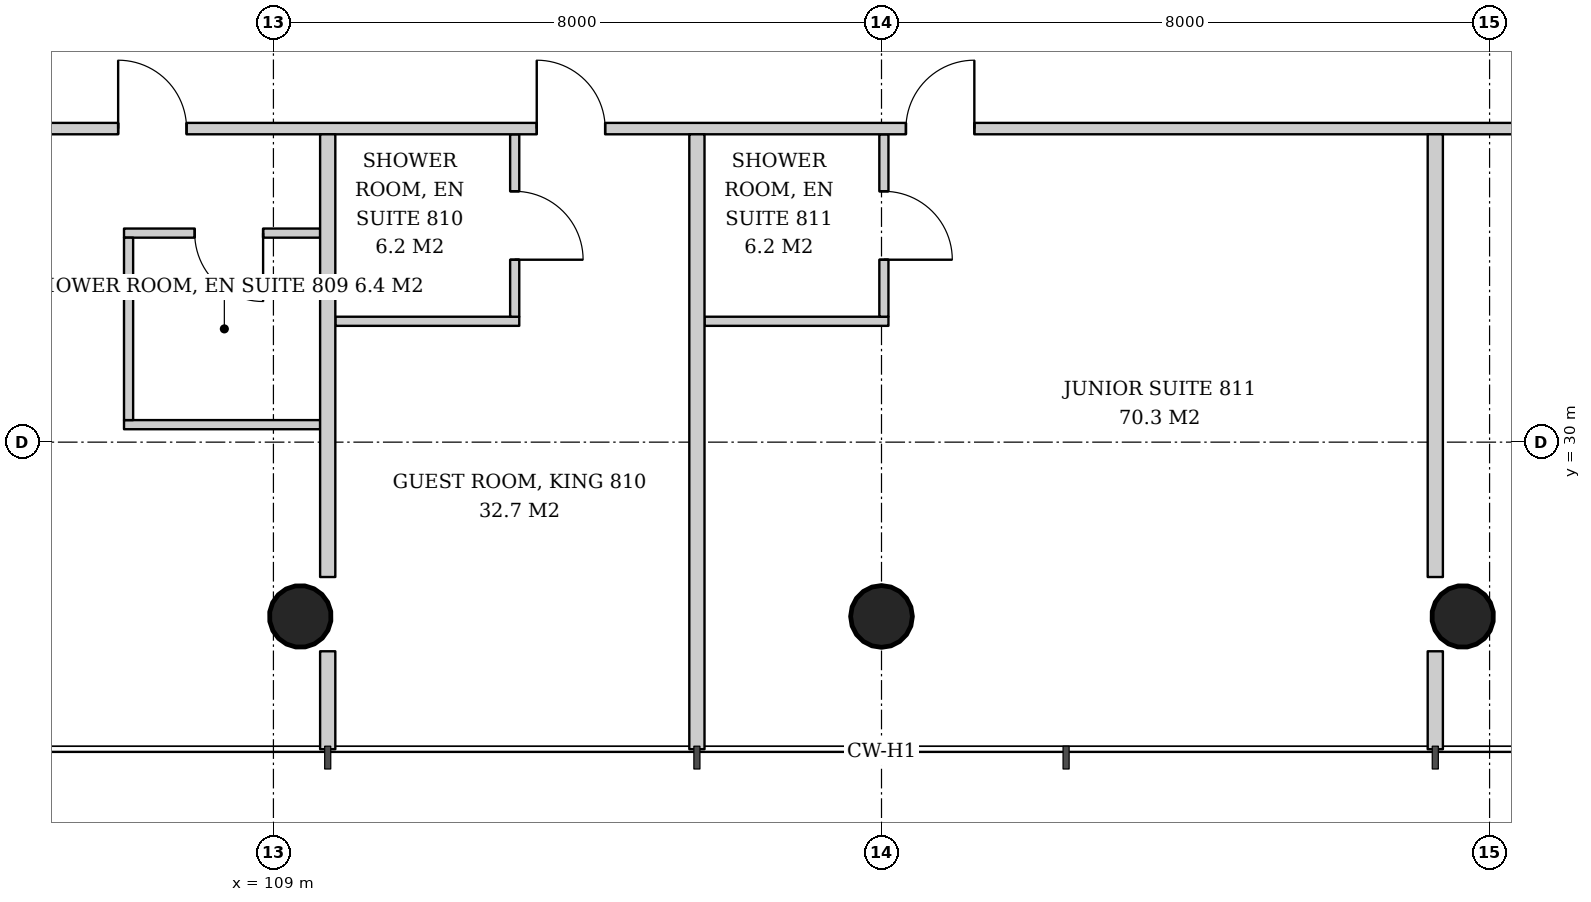
"""IFC4 building model, lengths in metres.
Left out: names, types, materials, properties, quantities, classifications, styles, units other than length and angle.
Written with IfcOpenShell. Run it as: python <this file> out.ifc"""

import sys

from ifc_helpers import new_model, si_unit, direction, frame, frame_2d, origin, origin_2d, place, context, subcontext, project, spatial, rectangle, hollow_circle, extrude, element, fill, save


model = new_model("IFC4")
c1 = context("Model", 3, precision=1e-05, world=origin(), true_north=direction((0.0, 1.0)))
c2 = subcontext(c1, "Body", "Model", "MODEL_VIEW")
j1 = project(units=[si_unit("LENGTHUNIT", "METRE"), si_unit("PLANEANGLEUNIT", "RADIAN")], contexts=[c1])
p1 = place(None, origin())
s1 = spatial("IfcSite", under=j1, at=p1, CompositionType="ELEMENT")
p2 = place(p1, origin())
s2 = spatial("IfcBuilding", under=s1, at=p2, CompositionType="ELEMENT")
p3 = place(p2, frame((0.0, 0.0, 36.2)))
s3 = spatial("IfcBuildingStorey", under=s2, at=p3, CompositionType="ELEMENT", Elevation=36.2)
p4 = place(p3, frame((109.328, 27.655, 0.0), z_axis=(0.021497765643, 0.042995531285, 0.998843946952), x_axis=(-0.894427191, 0.4472135955, 0.0)))
e1 = element("IfcColumn", 1, at=p4, inside=s3, PredefinedType="COLUMN", context=c2, shape_type="SweptSolid", body=[
    extrude(hollow_circle(Radius=0.406, WallThickness=0.03, at=origin_2d()), origin(), (0.0, 0.0, 1.0), 3.804),
])
p5 = place(p3, frame((117.0, 27.655, 0.0), z_axis=(0.0, 0.043005470007, 0.999074836811), x_axis=(-1.0, 0.0, 0.0)))
e2 = element("IfcColumn", 2, at=p5, inside=s3, PredefinedType="COLUMN", context=c2, shape_type="SweptSolid", body=[
    extrude(hollow_circle(Radius=0.406, WallThickness=0.03, at=origin_2d()), origin(), (0.0, 0.0, 1.0), 3.803),
])
p6 = place(p3, frame((124.672, 27.655, 0.0), z_axis=(-0.021497765643, 0.042995531285, 0.998843946952), x_axis=(-0.894427191, -0.4472135955, 0.0)))
e3 = element("IfcColumn", 3, at=p6, inside=s3, PredefinedType="COLUMN", context=c2, shape_type="SweptSolid", body=[
    extrude(hollow_circle(Radius=0.406, WallThickness=0.03, at=origin_2d()), origin(), (0.0, 0.0, 1.0), 3.804),
])
p7 = place(p3, frame((109.614, 32.75, 0.0), z_axis=(0.0, 0.0, 1.0), x_axis=(-1.0, 0.0, 0.0)))
e4 = element("IfcWall", 4, at=p7, inside=s3, PredefinedType="PARTITIONING", context=c2, shape_type="SweptSolid", body=[
    extrude(rectangle(XDim=2.58, YDim=0.12, at=frame_2d((1.29, 0.0))), origin(), (0.0, 0.0, 1.0), 2.8),
])
p8 = place(p7, frame((0.75, 0.0, 0.0)))
e5 = element("IfcOpeningElement", 5, at=p8, cuts=e4, PredefinedType="OPENING", context=c2, shape_type="SweptSolid", body=[
    extrude(rectangle(XDim=0.9, YDim=2.1, at=frame_2d((0.45, 1.05))), frame((0.0, 0.07, 0.0), z_axis=(0.0, -1.0, 0.0), x_axis=(1.0, 0.0, 0.0)), (0.0, 0.0, 1.0), 0.14),
])
p9 = place(p3, frame((109.614, 30.23, 0.0), z_axis=(0.0, 0.0, 1.0), x_axis=(-1.0, 0.0, 0.0)))
e6 = element("IfcWall", 6, at=p9, inside=s3, PredefinedType="PARTITIONING", context=c2, shape_type="SweptSolid", body=[
    extrude(rectangle(XDim=2.58, YDim=0.12, at=frame_2d((1.29, 0.0))), origin(), (0.0, 0.0, 1.0), 2.8),
])
p10 = place(p3, frame((107.094, 32.69, 0.0), z_axis=(0.0, 0.0, 1.0), x_axis=(0.0, -1.0, 0.0)))
e7 = element("IfcWall", 7, at=p10, inside=s3, PredefinedType="PARTITIONING", context=c2, shape_type="SweptSolid", body=[
    extrude(rectangle(XDim=2.4, YDim=0.12, at=frame_2d((1.2, 0.0))), origin(), (0.0, 0.0, 1.0), 2.847),
])
p11 = place(p3, frame((109.814, 31.59, 0.0), z_axis=(0.0, 0.0, 1.0), x_axis=(1.0, 0.0, 0.0)))
e8 = element("IfcWall", 8, at=p11, inside=s3, PredefinedType="PARTITIONING", context=c2, shape_type="SweptSolid", body=[
    extrude(rectangle(XDim=2.42, YDim=0.12, at=frame_2d((1.21, 0.0))), origin(), (0.0, 0.0, 1.0), 2.847),
])
p12 = place(p3, frame((112.174, 34.05, 0.0), z_axis=(0.0, 0.0, 1.0), x_axis=(0.0, -1.0, 0.0)))
e9 = element("IfcWall", 9, at=p12, inside=s3, PredefinedType="PARTITIONING", context=c2, shape_type="SweptSolid", body=[
    extrude(rectangle(XDim=2.4, YDim=0.12, at=frame_2d((1.2, 0.0))), origin(), (0.0, 0.0, 1.0), 3.6),
])
p13 = place(p12, frame((0.75, 0.0, 0.0)))
e10 = element("IfcOpeningElement", 10, at=p13, cuts=e9, PredefinedType="OPENING", context=c2, shape_type="SweptSolid", body=[
    extrude(rectangle(XDim=0.9, YDim=2.1, at=frame_2d((0.45, 1.05))), frame((0.0, 0.07, 0.0), z_axis=(0.0, -1.0, 0.0), x_axis=(1.0, 0.0, 0.0)), (0.0, 0.0, 1.0), 0.14),
])
p14 = place(p3, frame((114.671, 31.59, 0.0), z_axis=(0.0, 0.0, 1.0), x_axis=(1.0, 0.0, 0.0)))
e11 = element("IfcWall", 11, at=p14, inside=s3, PredefinedType="PARTITIONING", context=c2, shape_type="SweptSolid", body=[
    extrude(rectangle(XDim=2.42, YDim=0.12, at=frame_2d((1.21, 0.0))), origin(), (0.0, 0.0, 1.0), 2.847),
])
p15 = place(p3, frame((117.031, 34.05, 0.0), z_axis=(0.0, 0.0, 1.0), x_axis=(0.0, -1.0, 0.0)))
e12 = element("IfcWall", 12, at=p15, inside=s3, PredefinedType="PARTITIONING", context=c2, shape_type="SweptSolid", body=[
    extrude(rectangle(XDim=2.4, YDim=0.12, at=frame_2d((1.2, 0.0))), origin(), (0.0, 0.0, 1.0), 3.6),
])
p16 = place(p15, frame((0.75, 0.0, 0.0)))
e13 = element("IfcOpeningElement", 13, at=p16, cuts=e12, PredefinedType="OPENING", context=c2, shape_type="SweptSolid", body=[
    extrude(rectangle(XDim=0.9, YDim=2.1, at=frame_2d((0.45, 1.05))), frame((0.0, 0.07, 0.0), z_axis=(0.0, -1.0, 0.0), x_axis=(1.0, 0.0, 0.0)), (0.0, 0.0, 1.0), 0.14),
])
p17 = place(p3, frame((105.05, 34.125, 0.0), z_axis=(0.0, 0.0, 1.0), x_axis=(1.0, 0.0, 0.0)))
e14 = element("IfcWall", 14, at=p17, inside=s3, PredefinedType="PARTITIONING", context=c2, shape_type="SweptSolid", body=[
    extrude(rectangle(XDim=23.75, YDim=0.15, at=frame_2d((11.875, 0.0))), origin(), (0.0, 0.0, 1.0), 2.8),
])
p18 = place(p17, frame((1.907, 0.0, 0.0)))
e15 = element("IfcOpeningElement", 15, at=p18, cuts=e14, PredefinedType="OPENING", context=c2, shape_type="SweptSolid", body=[
    extrude(rectangle(XDim=0.9, YDim=2.1, at=frame_2d((0.45, 1.05))), frame((0.0, 0.085, 0.0), z_axis=(0.0, -1.0, 0.0), x_axis=(1.0, 0.0, 0.0)), (0.0, 0.0, 1.0), 0.17),
])
p19 = place(p17, frame((7.414, 0.0, 0.0)))
e16 = element("IfcOpeningElement", 16, at=p19, cuts=e14, PredefinedType="OPENING", context=c2, shape_type="SweptSolid", body=[
    extrude(rectangle(XDim=0.9, YDim=2.1, at=frame_2d((0.45, 1.05))), frame((0.0, 0.085, 0.0), z_axis=(0.0, -1.0, 0.0), x_axis=(1.0, 0.0, 0.0)), (0.0, 0.0, 1.0), 0.17),
])
p20 = place(p17, frame((12.271, 0.0, 0.0)))
e17 = element("IfcOpeningElement", 17, at=p20, cuts=e14, PredefinedType="OPENING", context=c2, shape_type="SweptSolid", body=[
    extrude(rectangle(XDim=0.9, YDim=2.1, at=frame_2d((0.45, 1.05))), frame((0.0, 0.085, 0.0), z_axis=(0.0, -1.0, 0.0), x_axis=(1.0, 0.0, 0.0)), (0.0, 0.0, 1.0), 0.17),
])
p21 = place(p3, frame((109.714, 34.05, 0.0), z_axis=(0.0, 0.0, 1.0), x_axis=(0.0, -1.0, 0.0)))
e18 = element("IfcWall", 18, at=p21, inside=s3, PredefinedType="PARTITIONING", context=c2, shape_type="SweptSolid", body=[
    extrude(rectangle(XDim=5.824, YDim=0.2, at=frame_2d((2.912, 0.0))), origin(), (0.0, 0.0, 1.0), 3.6),
])
p22 = place(p3, frame((109.714, 27.249, 0.0), z_axis=(0.0, 0.0, 1.0), x_axis=(0.0, -1.0, 0.0)))
e19 = element("IfcWall", 19, at=p22, inside=s3, PredefinedType="PARTITIONING", context=c2, shape_type="SweptSolid", body=[
    extrude(rectangle(XDim=1.289, YDim=0.2, at=frame_2d((0.645, 0.0))), origin(), (0.0, 0.0, 1.0), 3.6),
])
p23 = place(p3, frame((114.572, 34.05, 0.0), z_axis=(0.0, 0.0, 1.0), x_axis=(0.0, -1.0, 0.0)))
e20 = element("IfcWall", 20, at=p23, inside=s3, PredefinedType="PARTITIONING", context=c2, shape_type="SweptSolid", body=[
    extrude(rectangle(XDim=8.09, YDim=0.2, at=frame_2d((4.045, 0.0))), origin(), (0.0, 0.0, 1.0), 3.05),
])
p24 = place(p3, frame((124.286, 34.05, 0.0), z_axis=(0.0, 0.0, 1.0), x_axis=(0.0, -1.0, 0.0)))
e21 = element("IfcWall", 21, at=p24, inside=s3, PredefinedType="PARTITIONING", context=c2, shape_type="SweptSolid", body=[
    extrude(rectangle(XDim=5.824, YDim=0.2, at=frame_2d((2.912, 0.0))), origin(), (0.0, 0.0, 1.0), 3.6),
])
p25 = place(p3, frame((124.286, 27.249, 0.0), z_axis=(0.0, 0.0, 1.0), x_axis=(0.0, -1.0, 0.0)))
e22 = element("IfcWall", 22, at=p25, inside=s3, PredefinedType="PARTITIONING", context=c2, shape_type="SweptSolid", body=[
    extrude(rectangle(XDim=1.289, YDim=0.2, at=frame_2d((0.645, 0.0))), origin(), (0.0, 0.0, 1.0), 3.6),
])
p26 = place(p8, origin())
e23 = element("IfcDoor", 23, at=p26, inside=s3, OperationType="SINGLE_SWING_LEFT", PredefinedType="DOOR", context=c2, shape_type="SweptSolid", body=[
    extrude(rectangle(XDim=0.9, YDim=2.1, at=frame_2d((0.45, 1.05))), frame((0.0, 0.025, 0.0), z_axis=(0.0, -1.0, 0.0), x_axis=(1.0, 0.0, 0.0)), (0.0, 0.0, 1.0), 0.05),
])
fill(e5, e23)
p27 = place(p13, origin())
e24 = element("IfcDoor", 24, at=p27, inside=s3, OperationType="SINGLE_SWING_RIGHT", PredefinedType="DOOR", context=c2, shape_type="SweptSolid", body=[
    extrude(rectangle(XDim=0.9, YDim=2.1, at=frame_2d((0.45, 1.05))), frame((0.0, 0.025, 0.0), z_axis=(0.0, -1.0, 0.0), x_axis=(1.0, 0.0, 0.0)), (0.0, 0.0, 1.0), 0.05),
])
fill(e10, e24)
p28 = place(p16, origin())
e25 = element("IfcDoor", 25, at=p28, inside=s3, OperationType="SINGLE_SWING_RIGHT", PredefinedType="DOOR", context=c2, shape_type="SweptSolid", body=[
    extrude(rectangle(XDim=0.9, YDim=2.1, at=frame_2d((0.45, 1.05))), frame((0.0, 0.025, 0.0), z_axis=(0.0, -1.0, 0.0), x_axis=(1.0, 0.0, 0.0)), (0.0, 0.0, 1.0), 0.05),
])
fill(e13, e25)
p29 = place(p18, origin())
e26 = element("IfcDoor", 26, at=p29, inside=s3, OperationType="SINGLE_SWING_LEFT", PredefinedType="DOOR", context=c2, shape_type="SweptSolid", body=[
    extrude(rectangle(XDim=0.9, YDim=2.1, at=frame_2d((0.45, 1.05))), frame((0.0, 0.025, 0.0), z_axis=(0.0, -1.0, 0.0), x_axis=(1.0, 0.0, 0.0)), (0.0, 0.0, 1.0), 0.05),
])
fill(e15, e26)
p30 = place(p19, origin())
e27 = element("IfcDoor", 27, at=p30, inside=s3, OperationType="SINGLE_SWING_LEFT", PredefinedType="DOOR", context=c2, shape_type="SweptSolid", body=[
    extrude(rectangle(XDim=0.9, YDim=2.1, at=frame_2d((0.45, 1.05))), frame((0.0, 0.025, 0.0), z_axis=(0.0, -1.0, 0.0), x_axis=(1.0, 0.0, 0.0)), (0.0, 0.0, 1.0), 0.05),
])
fill(e16, e27)
p31 = place(p20, origin())
e28 = element("IfcDoor", 28, at=p31, inside=s3, OperationType="SINGLE_SWING_RIGHT", PredefinedType="DOOR", context=c2, shape_type="SweptSolid", body=[
    extrude(rectangle(XDim=0.9, YDim=2.1, at=frame_2d((0.45, 1.05))), frame((0.0, 0.025, 0.0), z_axis=(0.0, -1.0, 0.0), x_axis=(1.0, 0.0, 0.0)), (0.0, 0.0, 1.0), 0.05),
])
fill(e17, e28)
save(model, sys.argv[1])
